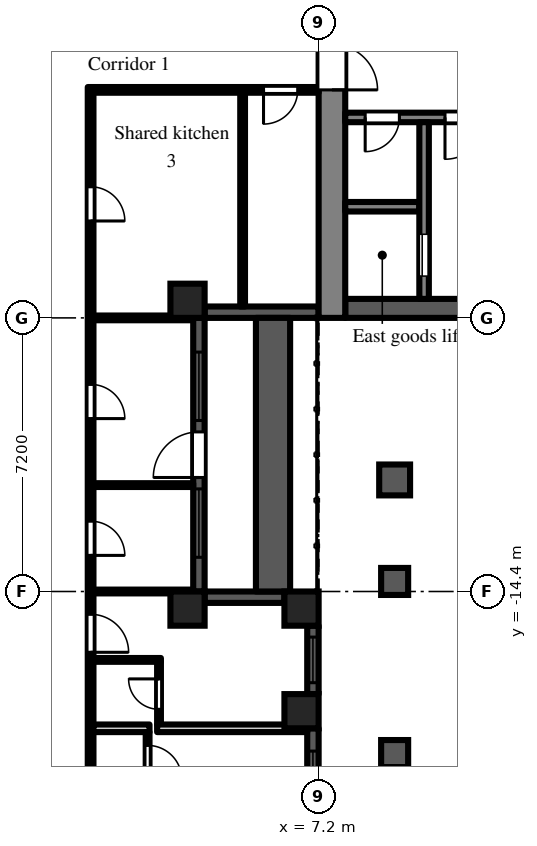
"""IFC4 building model, lengths in metres.
Left out: names, types, materials, properties, quantities, classifications, styles, units other than length and angle.
Written with IfcOpenShell. Run it as: python <this file> out.ifc"""

import sys

from ifc_helpers import new_model, si_unit, direction, frame, frame_2d, origin, origin_2d, place, context, subcontext, project, spatial, rectangle, extrude, element, fill, save


model = new_model("IFC4")
c1 = context("Model", 3, precision=1e-05, world=origin(), true_north=direction((0.0, 1.0)))
c2 = subcontext(c1, "Body", "Model", "MODEL_VIEW")
j1 = project(units=[si_unit("LENGTHUNIT", "METRE"), si_unit("PLANEANGLEUNIT", "RADIAN")], contexts=[c1])
p1 = place(None, origin())
s1 = spatial("IfcSite", under=j1, at=p1, CompositionType="ELEMENT")
p2 = place(p1, origin())
s2 = spatial("IfcBuilding", under=s1, at=p2, CompositionType="ELEMENT")
p3 = place(p2, frame((0.0, 0.0, 69.9)))
s3 = spatial("IfcBuildingStorey", under=s2, at=p3, CompositionType="ELEMENT", Elevation=69.9)
for number, where, z_axis, x_axis in (
    (1, (3.75, -14.85, 0.0), (0.0, 0.0, 1.0), (1.0, 0.0, 0.0)),
    (2, (3.75, -6.75, 0.0), (0.0, 0.0, 1.0), (1.0, 0.0, 0.0)),
    (3, (6.75, -17.55, 0.0), (0.0, 0.0, 1.0), (1.0, 0.0, 0.0)),
    (4, (6.75, -14.85, 0.0), (0.0, 0.0, 1.0), (1.0, 0.0, 0.0)),
):
    element("IfcColumn", number, at=place(p3, frame(where, z_axis=z_axis, x_axis=x_axis)), inside=s3, PredefinedType="COLUMN", context=c2, shape_type="SweptSolid", body=[
        extrude(rectangle(XDim=0.9, YDim=0.9, at=origin_2d()), origin(), (0.0, 0.0, 1.0), 3.0),
    ])
p4 = place(p3, frame((7.05, -21.15, 0.0), z_axis=(0.0, 0.0, 1.0), x_axis=(0.0, 1.0, 0.0)))
e5 = element("IfcWall", 5, at=p4, inside=s3, PredefinedType="SOLIDWALL", context=c2, shape_type="SweptSolid", body=[
    extrude(rectangle(XDim=3.15, YDim=0.3, at=frame_2d((1.575, 0.0))), origin(), (0.0, 0.0, 1.0), 2.1),
])
p5 = place(p4, frame((0.15, 0.0, 0.2)))
e6 = element("IfcOpeningElement", 6, at=p5, cuts=e5, PredefinedType="OPENING", context=c2, shape_type="SweptSolid", body=[
    extrude(rectangle(XDim=2.4, YDim=1.85, at=frame_2d((1.2, 0.925))), frame((0.0, 0.16, 0.0), z_axis=(0.0, -1.0, 0.0), x_axis=(1.0, 0.0, 0.0)), (0.0, 0.0, 1.0), 0.32),
])
p6 = place(p3, frame((7.05, -17.1, 0.0), z_axis=(0.0, 0.0, 1.0), x_axis=(0.0, 1.0, 0.0)))
e7 = element("IfcWall", 7, at=p6, inside=s3, PredefinedType="SOLIDWALL", context=c2, shape_type="SweptSolid", body=[
    extrude(rectangle(XDim=1.8, YDim=0.3, at=frame_2d((0.9, 0.0))), origin(), (0.0, 0.0, 1.0), 2.1),
])
p7 = place(p6, frame((0.3, 0.0, 0.2)))
e8 = element("IfcOpeningElement", 8, at=p7, cuts=e7, PredefinedType="OPENING", context=c2, shape_type="SweptSolid", body=[
    extrude(rectangle(XDim=1.2, YDim=1.85, at=frame_2d((0.6, 0.925))), frame((0.0, 0.16, 0.0), z_axis=(0.0, -1.0, 0.0), x_axis=(1.0, 0.0, 0.0)), (0.0, 0.0, 1.0), 0.32),
])
p8 = place(p3, frame((6.3, -14.55, 0.0), z_axis=(0.0, 0.0, 1.0), x_axis=(-1.0, 0.0, 0.0)))
e9 = element("IfcWall", 9, at=p8, inside=s3, PredefinedType="SOLIDWALL", context=c2, shape_type="SweptSolid", body=[
    extrude(rectangle(XDim=2.1, YDim=0.3, at=frame_2d((1.05, 0.0))), origin(), (0.0, 0.0, 1.0), 2.1),
])
p9 = place(p3, frame((4.05, -14.4, 0.0), z_axis=(0.0, 0.0, 1.0), x_axis=(0.0, 1.0, 0.0)))
e10 = element("IfcWall", 10, at=p9, inside=s3, PredefinedType="SOLIDWALL", context=c2, shape_type="SweptSolid", body=[
    extrude(rectangle(XDim=7.2, YDim=0.3, at=frame_2d((3.6, 0.0))), origin(), (0.0, 0.0, 1.0), 2.1),
])
p10 = place(p9, frame((3.0, 0.0, 0.0)))
e11 = element("IfcOpeningElement", 11, at=p10, cuts=e10, PredefinedType="OPENING", context=c2, shape_type="SweptSolid", body=[
    extrude(rectangle(XDim=1.2, YDim=2.05, at=frame_2d((0.6, 1.025))), frame((0.0, 0.16, 0.0), z_axis=(0.0, -1.0, 0.0), x_axis=(1.0, 0.0, 0.0)), (0.0, 0.0, 1.0), 0.32),
])
p11 = place(p9, frame((0.9, 0.0, 0.2)))
e12 = element("IfcOpeningElement", 12, at=p11, cuts=e10, PredefinedType="OPENING", context=c2, shape_type="SweptSolid", body=[
    extrude(rectangle(XDim=1.8, YDim=1.85, at=frame_2d((0.9, 0.925))), frame((0.0, 0.16, 0.0), z_axis=(0.0, -1.0, 0.0), x_axis=(1.0, 0.0, 0.0)), (0.0, 0.0, 1.0), 0.32),
])
p12 = place(p9, frame((4.5, 0.0, 0.2)))
e13 = element("IfcOpeningElement", 13, at=p12, cuts=e10, PredefinedType="OPENING", context=c2, shape_type="SweptSolid", body=[
    extrude(rectangle(XDim=1.8, YDim=1.85, at=frame_2d((0.9, 0.925))), frame((0.0, 0.16, 0.0), z_axis=(0.0, -1.0, 0.0), x_axis=(1.0, 0.0, 0.0)), (0.0, 0.0, 1.0), 0.32),
])
p13 = place(p3, frame((4.2, -7.05, 0.0), z_axis=(0.0, 0.0, 1.0), x_axis=(1.0, 0.0, 0.0)))
e14 = element("IfcWall", 14, at=p13, inside=s3, PredefinedType="SOLIDWALL", context=c2, shape_type="SweptSolid", body=[
    extrude(rectangle(XDim=3.0, YDim=0.3, at=frame_2d((1.5, 0.0))), origin(), (0.0, 0.0, 1.0), 2.1),
])
p14 = place(p3, frame((6.0, -14.4, 0.0), z_axis=(0.0, 0.0, 1.0), x_axis=(0.0, 1.0, 0.0)))
e15 = element("IfcWall", 15, at=p14, inside=s3, PredefinedType="PARAPET", context=c2, shape_type="SweptSolid", body=[
    extrude(rectangle(XDim=7.2, YDim=0.9, at=frame_2d((3.6, 0.0))), origin(), (0.0, 0.0, 1.0), 0.8),
])
p15 = place(p3, frame((7.55, -7.2, 0.0), z_axis=(0.0, 0.0, 1.0), x_axis=(0.0, 1.0, 0.0)))
e16 = element("IfcWall", 16, at=p15, inside=s3, PredefinedType="SHEAR", context=c2, shape_type="SweptSolid", body=[
    extrude(rectangle(XDim=14.4, YDim=0.7, at=frame_2d((7.2, 0.0))), origin(), (0.0, 0.0, 1.0), 2.575),
])
p16 = place(p15, frame((6.0, 0.0, 0.0)))
e17 = element("IfcOpeningElement", 17, at=p16, cuts=e16, PredefinedType="OPENING", context=c2, shape_type="SweptSolid", body=[
    extrude(rectangle(XDim=2.4, YDim=2.2, at=frame_2d((1.2, 1.1))), frame((0.0, 0.36, 0.0), z_axis=(0.0, -1.0, 0.0), x_axis=(1.0, 0.0, 0.0)), (0.0, 0.0, 1.0), 0.72),
])
p17 = place(p3, frame((7.9, -6.95, 0.0), z_axis=(0.0, 0.0, 1.0), x_axis=(1.0, 0.0, 0.0)))
e18 = element("IfcWall", 18, at=p17, inside=s3, PredefinedType="SHEAR", context=c2, shape_type="SweptSolid", body=[
    extrude(rectangle(XDim=12.95, YDim=0.5, at=frame_2d((6.475, 0.0))), origin(), (0.0, 0.0, 1.0), 2.575),
])
p18 = place(p3, frame((7.9, -1.925, 0.0), z_axis=(0.0, 0.0, 1.0), x_axis=(1.0, 0.0, 0.0)))
e19 = element("IfcWall", 19, at=p18, inside=s3, PredefinedType="SHEAR", context=c2, shape_type="SweptSolid", body=[
    extrude(rectangle(XDim=12.95, YDim=0.25, at=frame_2d((6.475, 0.0))), origin(), (0.0, 0.0, 1.0), 2.575),
])
p19 = place(p18, frame((4.825, 0.0, 0.0)))
e20 = element("IfcOpeningElement", 20, at=p19, cuts=e19, PredefinedType="OPENING", context=c2, shape_type="SweptSolid", body=[
    extrude(rectangle(XDim=1.1, YDim=2.1, at=frame_2d((0.55, 1.05))), frame((0.0, 0.135, 0.0), z_axis=(0.0, -1.0, 0.0), x_axis=(1.0, 0.0, 0.0)), (0.0, 0.0, 1.0), 0.27),
])
p20 = place(p18, frame((7.025, 0.0, 0.0)))
e21 = element("IfcOpeningElement", 21, at=p20, cuts=e19, PredefinedType="OPENING", context=c2, shape_type="SweptSolid", body=[
    extrude(rectangle(XDim=1.1, YDim=2.1, at=frame_2d((0.55, 1.05))), frame((0.0, 0.135, 0.0), z_axis=(0.0, -1.0, 0.0), x_axis=(1.0, 0.0, 0.0)), (0.0, 0.0, 1.0), 0.27),
])
p21 = place(p18, frame((9.225, 0.0, 0.0)))
e22 = element("IfcOpeningElement", 22, at=p21, cuts=e19, PredefinedType="OPENING", context=c2, shape_type="SweptSolid", body=[
    extrude(rectangle(XDim=1.1, YDim=2.1, at=frame_2d((0.55, 1.05))), frame((0.0, 0.135, 0.0), z_axis=(0.0, -1.0, 0.0), x_axis=(1.0, 0.0, 0.0)), (0.0, 0.0, 1.0), 0.27),
])
p22 = place(p18, frame((0.525, 0.0, 0.0)))
e23 = element("IfcOpeningElement", 23, at=p22, cuts=e19, PredefinedType="OPENING", context=c2, shape_type="SweptSolid", body=[
    extrude(rectangle(XDim=0.9, YDim=2.1, at=frame_2d((0.45, 1.05))), frame((0.0, 0.135, 0.0), z_axis=(0.0, -1.0, 0.0), x_axis=(1.0, 0.0, 0.0)), (0.0, 0.0, 1.0), 0.27),
])
p23 = place(p18, frame((2.625, 0.0, 0.0)))
e24 = element("IfcOpeningElement", 24, at=p23, cuts=e19, PredefinedType="OPENING", context=c2, shape_type="SweptSolid", body=[
    extrude(rectangle(XDim=1.1, YDim=2.1, at=frame_2d((0.55, 1.05))), frame((0.0, 0.135, 0.0), z_axis=(0.0, -1.0, 0.0), x_axis=(1.0, 0.0, 0.0)), (0.0, 0.0, 1.0), 0.27),
])
p24 = place(p3, frame((7.9, -4.275, 0.0), z_axis=(0.0, 0.0, 1.0), x_axis=(1.0, 0.0, 0.0)))
e25 = element("IfcWall", 25, at=p24, inside=s3, PredefinedType="SHEAR", context=c2, shape_type="SweptSolid", body=[
    extrude(rectangle(XDim=1.95, YDim=0.25, at=frame_2d((0.975, 0.0))), origin(), (0.0, 0.0, 1.0), 2.575),
])
p25 = place(p3, frame((9.975, -2.05, 0.0), z_axis=(0.0, 0.0, 1.0), x_axis=(0.0, -1.0, 0.0)))
e26 = element("IfcWall", 26, at=p25, inside=s3, PredefinedType="SHEAR", context=c2, shape_type="SweptSolid", body=[
    extrude(rectangle(XDim=4.65, YDim=0.25, at=frame_2d((2.325, 0.0))), origin(), (0.0, 0.0, 1.0), 2.575),
])
p26 = place(p25, frame((2.95, 0.0, 0.0)))
e27 = element("IfcOpeningElement", 27, at=p26, cuts=e26, PredefinedType="OPENING", context=c2, shape_type="SweptSolid", body=[
    extrude(rectangle(XDim=1.1, YDim=2.1, at=frame_2d((0.55, 1.05))), frame((0.0, 0.135, 0.0), z_axis=(0.0, -1.0, 0.0), x_axis=(1.0, 0.0, 0.0)), (0.0, 0.0, 1.0), 0.27),
])
p27 = place(p3, frame((1.2, -36.5, 0.0), z_axis=(0.0, 0.0, 1.0), x_axis=(0.0, 1.0, 0.0)))
e28 = element("IfcWall", 28, at=p27, inside=s3, PredefinedType="PARTITIONING", context=c2, shape_type="SweptSolid", body=[
    extrude(rectangle(XDim=35.375, YDim=0.15, at=frame_2d((17.688, 0.0))), origin(), (0.0, 0.0, 1.0), 2.575),
])
p28 = place(p27, frame((31.85, 0.0, 0.0)))
e29 = element("IfcOpeningElement", 29, at=p28, cuts=e28, PredefinedType="OPENING", context=c2, shape_type="SweptSolid", body=[
    extrude(rectangle(XDim=0.9, YDim=2.1, at=frame_2d((0.45, 1.05))), frame((0.0, 0.085, 0.0), z_axis=(0.0, -1.0, 0.0), x_axis=(1.0, 0.0, 0.0)), (0.0, 0.0, 1.0), 0.17),
])
p29 = place(p27, frame((23.05, 0.0, 0.0)))
e30 = element("IfcOpeningElement", 30, at=p29, cuts=e28, PredefinedType="OPENING", context=c2, shape_type="SweptSolid", body=[
    extrude(rectangle(XDim=0.9, YDim=2.1, at=frame_2d((0.45, 1.05))), frame((0.0, 0.085, 0.0), z_axis=(0.0, -1.0, 0.0), x_axis=(1.0, 0.0, 0.0)), (0.0, 0.0, 1.0), 0.17),
])
p30 = place(p27, frame((26.65, 0.0, 0.0)))
e31 = element("IfcOpeningElement", 31, at=p30, cuts=e28, PredefinedType="OPENING", context=c2, shape_type="SweptSolid", body=[
    extrude(rectangle(XDim=0.9, YDim=2.1, at=frame_2d((0.45, 1.05))), frame((0.0, 0.085, 0.0), z_axis=(0.0, -1.0, 0.0), x_axis=(1.0, 0.0, 0.0)), (0.0, 0.0, 1.0), 0.17),
])
p31 = place(p27, frame((20.5, 0.0, 0.0)))
e32 = element("IfcOpeningElement", 32, at=p31, cuts=e28, PredefinedType="OPENING", context=c2, shape_type="SweptSolid", body=[
    extrude(rectangle(XDim=1.0, YDim=2.1, at=frame_2d((0.5, 1.05))), frame((0.0, 0.085, 0.0), z_axis=(0.0, -1.0, 0.0), x_axis=(1.0, 0.0, 0.0)), (0.0, 0.0, 1.0), 0.17),
])
p32 = place(p27, frame((1.55, 0.0, 0.0)))
e33 = element("IfcOpeningElement", 33, at=p32, cuts=e28, PredefinedType="OPENING", context=c2, shape_type="SweptSolid", body=[
    extrude(rectangle(XDim=1.0, YDim=2.1, at=frame_2d((0.5, 1.05))), frame((0.0, 0.085, 0.0), z_axis=(0.0, -1.0, 0.0), x_axis=(1.0, 0.0, 0.0)), (0.0, 0.0, 1.0), 0.17),
])
p33 = place(p3, frame((1.275, -18.0, 0.0), z_axis=(0.0, 0.0, 1.0), x_axis=(1.0, 0.0, 0.0)))
e34 = element("IfcWall", 34, at=p33, inside=s3, PredefinedType="PARTITIONING", context=c2, shape_type="SweptSolid", body=[
    extrude(rectangle(XDim=1.475, YDim=0.2, at=frame_2d((0.738, 0.0))), origin(), (0.0, 0.0, 1.0), 2.575),
])
p34 = place(p3, frame((1.275, -16.2, 0.0), z_axis=(0.0, 0.0, 1.0), x_axis=(1.0, 0.0, 0.0)))
e35 = element("IfcWall", 35, at=p34, inside=s3, PredefinedType="PARTITIONING", context=c2, shape_type="SweptSolid", body=[
    extrude(rectangle(XDim=1.775, YDim=0.1, at=frame_2d((0.888, 0.0))), origin(), (0.0, 0.0, 1.0), 2.575),
])
for number, where, z_axis, x_axis in (
    (36, (1.275, -14.4, 0.0), (0.0, 0.0, 1.0), (1.0, 0.0, 0.0)),
    (37, (1.275, -11.6, 0.0), (0.0, 0.0, 1.0), (1.0, 0.0, 0.0)),
):
    element("IfcWall", number, at=place(p3, frame(where, z_axis=z_axis, x_axis=x_axis)), inside=s3, PredefinedType="PARTITIONING", context=c2, shape_type="SweptSolid", body=[
        extrude(rectangle(XDim=2.625, YDim=0.1, at=frame_2d((1.312, 0.0))), origin(), (0.0, 0.0, 1.0), 2.575),
    ])
p35 = place(p3, frame((1.275, -7.2, 0.0), z_axis=(0.0, 0.0, 1.0), x_axis=(1.0, 0.0, 0.0)))
e38 = element("IfcWall", 38, at=p35, inside=s3, PredefinedType="PARTITIONING", context=c2, shape_type="SweptSolid", body=[
    extrude(rectangle(XDim=2.625, YDim=0.125, at=frame_2d((1.312, 0.0))), origin(), (0.0, 0.0, 1.0), 2.575),
])
p36 = place(p3, frame((1.275, -1.2, 0.0), z_axis=(0.0, 0.0, 1.0), x_axis=(1.0, 0.0, 0.0)))
e39 = element("IfcWall", 39, at=p36, inside=s3, PredefinedType="PARTITIONING", context=c2, shape_type="SweptSolid", body=[
    extrude(rectangle(XDim=5.925, YDim=0.15, at=frame_2d((2.962, 0.0))), origin(), (0.0, 0.0, 1.0), 2.575),
])
p37 = place(p36, frame((4.475, 0.0, 0.0)))
e40 = element("IfcOpeningElement", 40, at=p37, cuts=e39, PredefinedType="OPENING", context=c2, shape_type="SweptSolid", body=[
    extrude(rectangle(XDim=0.9, YDim=2.1, at=frame_2d((0.45, 1.05))), frame((0.0, 0.085, 0.0), z_axis=(0.0, -1.0, 0.0), x_axis=(1.0, 0.0, 0.0)), (0.0, 0.0, 1.0), 0.17),
])
p38 = place(p3, frame((2.7, -32.35, 0.0), z_axis=(0.0, 0.0, 1.0), x_axis=(0.0, 1.0, 0.0)))
e41 = element("IfcWall", 41, at=p38, inside=s3, PredefinedType="PARTITIONING", context=c2, shape_type="SweptSolid", body=[
    extrude(rectangle(XDim=14.25, YDim=0.1, at=frame_2d((7.125, 0.0))), origin(), (0.0, 0.0, 1.0), 2.575),
])
p39 = place(p38, frame((0.4, 0.0, 0.0)))
e42 = element("IfcOpeningElement", 42, at=p39, cuts=e41, PredefinedType="OPENING", context=c2, shape_type="SweptSolid", body=[
    extrude(rectangle(XDim=0.9, YDim=2.1, at=frame_2d((0.45, 1.05))), frame((0.0, 0.06, 0.0), z_axis=(0.0, -1.0, 0.0), x_axis=(1.0, 0.0, 0.0)), (0.0, 0.0, 1.0), 0.12),
])
p40 = place(p38, frame((5.8, 0.0, 0.0)))
e43 = element("IfcOpeningElement", 43, at=p40, cuts=e41, PredefinedType="OPENING", context=c2, shape_type="SweptSolid", body=[
    extrude(rectangle(XDim=0.9, YDim=2.1, at=frame_2d((0.45, 1.05))), frame((0.0, 0.06, 0.0), z_axis=(0.0, -1.0, 0.0), x_axis=(1.0, 0.0, 0.0)), (0.0, 0.0, 1.0), 0.12),
])
p41 = place(p38, frame((7.6, 0.0, 0.0)))
e44 = element("IfcOpeningElement", 44, at=p41, cuts=e41, PredefinedType="OPENING", context=c2, shape_type="SweptSolid", body=[
    extrude(rectangle(XDim=0.9, YDim=2.1, at=frame_2d((0.45, 1.05))), frame((0.0, 0.06, 0.0), z_axis=(0.0, -1.0, 0.0), x_axis=(1.0, 0.0, 0.0)), (0.0, 0.0, 1.0), 0.12),
])
p42 = place(p38, frame((13.0, 0.0, 0.0)))
e45 = element("IfcOpeningElement", 45, at=p42, cuts=e41, PredefinedType="OPENING", context=c2, shape_type="SweptSolid", body=[
    extrude(rectangle(XDim=0.9, YDim=2.1, at=frame_2d((0.45, 1.05))), frame((0.0, 0.06, 0.0), z_axis=(0.0, -1.0, 0.0), x_axis=(1.0, 0.0, 0.0)), (0.0, 0.0, 1.0), 0.12),
])
p43 = place(p3, frame((3.0, -17.9, 0.0), z_axis=(0.0, 0.0, 1.0), x_axis=(0.0, 1.0, 0.0)))
e46 = element("IfcWall", 46, at=p43, inside=s3, PredefinedType="PARTITIONING", context=c2, shape_type="SweptSolid", body=[
    extrude(rectangle(XDim=1.65, YDim=0.1, at=frame_2d((0.825, 0.0))), origin(), (0.0, 0.0, 1.0), 2.575),
])
p44 = place(p43, frame((0.4, 0.0, 0.0)))
e47 = element("IfcOpeningElement", 47, at=p44, cuts=e46, PredefinedType="OPENING", context=c2, shape_type="SweptSolid", body=[
    extrude(rectangle(XDim=0.8, YDim=2.1, at=frame_2d((0.4, 1.05))), frame((0.0, 0.06, 0.0), z_axis=(0.0, -1.0, 0.0), x_axis=(1.0, 0.0, 0.0)), (0.0, 0.0, 1.0), 0.12),
])
p45 = place(p3, frame((2.95, -18.0, 0.0), z_axis=(0.0, 0.0, 1.0), x_axis=(1.0, 0.0, 0.0)))
e48 = element("IfcWall", 48, at=p45, inside=s3, PredefinedType="PARTITIONING", context=c2, shape_type="SweptSolid", body=[
    extrude(rectangle(XDim=3.95, YDim=0.2, at=frame_2d((1.975, 0.0))), origin(), (0.0, 0.0, 1.0), 2.575),
])
p46 = place(p3, frame((5.2, -6.9, 0.0), z_axis=(0.0, 0.0, 1.0), x_axis=(0.0, 1.0, 0.0)))
e49 = element("IfcWall", 49, at=p46, inside=s3, PredefinedType="PARTITIONING", context=c2, shape_type="SweptSolid", body=[
    extrude(rectangle(XDim=5.625, YDim=0.125, at=frame_2d((2.812, 0.0))), origin(), (0.0, 0.0, 1.0), 2.575),
])
p47 = place(p5, origin())
e50 = element("IfcWindow", 50, at=p47, inside=s3, PartitioningType="SINGLE_PANEL", PredefinedType="WINDOW", context=c2, shape_type="SweptSolid", body=[
    extrude(rectangle(XDim=2.4, YDim=1.85, at=frame_2d((1.2, 0.925))), frame((0.0, 0.03, 0.0), z_axis=(0.0, -1.0, 0.0), x_axis=(1.0, 0.0, 0.0)), (0.0, 0.0, 1.0), 0.06),
])
fill(e6, e50)
p48 = place(p7, origin())
e51 = element("IfcWindow", 51, at=p48, inside=s3, PartitioningType="SINGLE_PANEL", PredefinedType="WINDOW", context=c2, shape_type="SweptSolid", body=[
    extrude(rectangle(XDim=1.2, YDim=1.85, at=frame_2d((0.6, 0.925))), frame((0.0, 0.03, 0.0), z_axis=(0.0, -1.0, 0.0), x_axis=(1.0, 0.0, 0.0)), (0.0, 0.0, 1.0), 0.06),
])
fill(e8, e51)
p49 = place(p10, origin())
e52 = element("IfcDoor", 52, at=p49, inside=s3, OperationType="SINGLE_SWING_LEFT", PredefinedType="DOOR", context=c2, shape_type="SweptSolid", body=[
    extrude(rectangle(XDim=1.2, YDim=2.05, at=frame_2d((0.6, 1.025))), frame((0.0, 0.025, 0.0), z_axis=(0.0, -1.0, 0.0), x_axis=(1.0, 0.0, 0.0)), (0.0, 0.0, 1.0), 0.05),
])
fill(e11, e52)
p50 = place(p11, origin())
e53 = element("IfcWindow", 53, at=p50, inside=s3, PartitioningType="SINGLE_PANEL", PredefinedType="WINDOW", context=c2, shape_type="SweptSolid", body=[
    extrude(rectangle(XDim=1.8, YDim=1.85, at=frame_2d((0.9, 0.925))), frame((0.0, 0.03, 0.0), z_axis=(0.0, -1.0, 0.0), x_axis=(1.0, 0.0, 0.0)), (0.0, 0.0, 1.0), 0.06),
])
fill(e12, e53)
p51 = place(p12, origin())
e54 = element("IfcWindow", 54, at=p51, inside=s3, PartitioningType="SINGLE_PANEL", PredefinedType="WINDOW", context=c2, shape_type="SweptSolid", body=[
    extrude(rectangle(XDim=1.8, YDim=1.85, at=frame_2d((0.9, 0.925))), frame((0.0, 0.03, 0.0), z_axis=(0.0, -1.0, 0.0), x_axis=(1.0, 0.0, 0.0)), (0.0, 0.0, 1.0), 0.06),
])
fill(e13, e54)
p52 = place(p26, origin())
e55 = element("IfcDoor", 55, at=p52, inside=s3, OperationType="SLIDING_TO_LEFT", PredefinedType="DOOR", context=c2, shape_type="SweptSolid", body=[
    extrude(rectangle(XDim=1.1, YDim=2.1, at=frame_2d((0.55, 1.05))), frame((0.0, 0.025, 0.0), z_axis=(0.0, -1.0, 0.0), x_axis=(1.0, 0.0, 0.0)), (0.0, 0.0, 1.0), 0.05),
])
fill(e27, e55)
p53 = place(p22, frame((0.9, 0.0, 0.0), z_axis=(0.0, 0.0, 1.0), x_axis=(-1.0, 0.0, 0.0)))
e56 = element("IfcDoor", 56, at=p53, inside=s3, OperationType="SINGLE_SWING_RIGHT", PredefinedType="DOOR", context=c2, shape_type="SweptSolid", body=[
    extrude(rectangle(XDim=0.9, YDim=2.1, at=frame_2d((0.45, 1.05))), frame((0.0, 0.025, 0.0), z_axis=(0.0, -1.0, 0.0), x_axis=(1.0, 0.0, 0.0)), (0.0, 0.0, 1.0), 0.05),
])
fill(e23, e56)
p54 = place(p23, frame((1.1, 0.0, 0.0), z_axis=(0.0, 0.0, 1.0), x_axis=(-1.0, 0.0, 0.0)))
e57 = element("IfcDoor", 57, at=p54, inside=s3, OperationType="SINGLE_SWING_RIGHT", PredefinedType="DOOR", context=c2, shape_type="SweptSolid", body=[
    extrude(rectangle(XDim=1.1, YDim=2.1, at=frame_2d((0.55, 1.05))), frame((0.0, 0.025, 0.0), z_axis=(0.0, -1.0, 0.0), x_axis=(1.0, 0.0, 0.0)), (0.0, 0.0, 1.0), 0.05),
])
fill(e24, e57)
p55 = place(p16, frame((2.4, 0.0, 0.0), z_axis=(0.0, 0.0, 1.0), x_axis=(-1.0, 0.0, 0.0)))
e58 = element("IfcDoor", 58, at=p55, inside=s3, OperationType="DOUBLE_DOOR_DOUBLE_SWING", PredefinedType="DOOR", context=c2, shape_type="SweptSolid", body=[
    extrude(rectangle(XDim=2.4, YDim=2.2, at=frame_2d((1.2, 1.1))), frame((0.0, 0.025, 0.0), z_axis=(0.0, -1.0, 0.0), x_axis=(1.0, 0.0, 0.0)), (0.0, 0.0, 1.0), 0.05),
])
fill(e17, e58)
p56 = place(p28, frame((0.9, 0.0, 0.0), z_axis=(0.0, 0.0, 1.0), x_axis=(-1.0, 0.0, 0.0)))
e59 = element("IfcDoor", 59, at=p56, inside=s3, OperationType="SINGLE_SWING_RIGHT", PredefinedType="DOOR", context=c2, shape_type="SweptSolid", body=[
    extrude(rectangle(XDim=0.9, YDim=2.1, at=frame_2d((0.45, 1.05))), frame((0.0, 0.025, 0.0), z_axis=(0.0, -1.0, 0.0), x_axis=(1.0, 0.0, 0.0)), (0.0, 0.0, 1.0), 0.05),
])
fill(e29, e59)
p57 = place(p37, frame((0.9, 0.0, 0.0), z_axis=(0.0, 0.0, 1.0), x_axis=(-1.0, 0.0, 0.0)))
e60 = element("IfcDoor", 60, at=p57, inside=s3, OperationType="SINGLE_SWING_RIGHT", PredefinedType="DOOR", context=c2, shape_type="SweptSolid", body=[
    extrude(rectangle(XDim=0.9, YDim=2.1, at=frame_2d((0.45, 1.05))), frame((0.0, 0.025, 0.0), z_axis=(0.0, -1.0, 0.0), x_axis=(1.0, 0.0, 0.0)), (0.0, 0.0, 1.0), 0.05),
])
fill(e40, e60)
p58 = place(p29, frame((0.9, 0.0, 0.0), z_axis=(0.0, 0.0, 1.0), x_axis=(-1.0, 0.0, 0.0)))
e61 = element("IfcDoor", 61, at=p58, inside=s3, OperationType="SINGLE_SWING_RIGHT", PredefinedType="DOOR", context=c2, shape_type="SweptSolid", body=[
    extrude(rectangle(XDim=0.9, YDim=2.1, at=frame_2d((0.45, 1.05))), frame((0.0, 0.025, 0.0), z_axis=(0.0, -1.0, 0.0), x_axis=(1.0, 0.0, 0.0)), (0.0, 0.0, 1.0), 0.05),
])
fill(e30, e61)
p59 = place(p30, frame((0.9, 0.0, 0.0), z_axis=(0.0, 0.0, 1.0), x_axis=(-1.0, 0.0, 0.0)))
e62 = element("IfcDoor", 62, at=p59, inside=s3, OperationType="SINGLE_SWING_RIGHT", PredefinedType="DOOR", context=c2, shape_type="SweptSolid", body=[
    extrude(rectangle(XDim=0.9, YDim=2.1, at=frame_2d((0.45, 1.05))), frame((0.0, 0.025, 0.0), z_axis=(0.0, -1.0, 0.0), x_axis=(1.0, 0.0, 0.0)), (0.0, 0.0, 1.0), 0.05),
])
fill(e31, e62)
p60 = place(p44, origin())
e63 = element("IfcDoor", 63, at=p60, inside=s3, OperationType="SINGLE_SWING_RIGHT", PredefinedType="DOOR", context=c2, shape_type="SweptSolid", body=[
    extrude(rectangle(XDim=0.8, YDim=2.1, at=frame_2d((0.4, 1.05))), frame((0.0, 0.025, 0.0), z_axis=(0.0, -1.0, 0.0), x_axis=(1.0, 0.0, 0.0)), (0.0, 0.0, 1.0), 0.05),
])
fill(e47, e63)
p61 = place(p31, frame((1.0, 0.0, 0.0), z_axis=(0.0, 0.0, 1.0), x_axis=(-1.0, 0.0, 0.0)))
e64 = element("IfcDoor", 64, at=p61, inside=s3, OperationType="SINGLE_SWING_RIGHT", PredefinedType="DOOR", context=c2, shape_type="SweptSolid", body=[
    extrude(rectangle(XDim=1.0, YDim=2.1, at=frame_2d((0.5, 1.05))), frame((0.0, 0.025, 0.0), z_axis=(0.0, -1.0, 0.0), x_axis=(1.0, 0.0, 0.0)), (0.0, 0.0, 1.0), 0.05),
])
fill(e32, e64)
p62 = place(p42, frame((0.9, 0.0, 0.0), z_axis=(0.0, 0.0, 1.0), x_axis=(-1.0, 0.0, 0.0)))
e65 = element("IfcDoor", 65, at=p62, inside=s3, OperationType="SINGLE_SWING_RIGHT", PredefinedType="DOOR", context=c2, shape_type="SweptSolid", body=[
    extrude(rectangle(XDim=0.9, YDim=2.1, at=frame_2d((0.45, 1.05))), frame((0.0, 0.025, 0.0), z_axis=(0.0, -1.0, 0.0), x_axis=(1.0, 0.0, 0.0)), (0.0, 0.0, 1.0), 0.05),
])
fill(e45, e65)
save(model, sys.argv[1])
